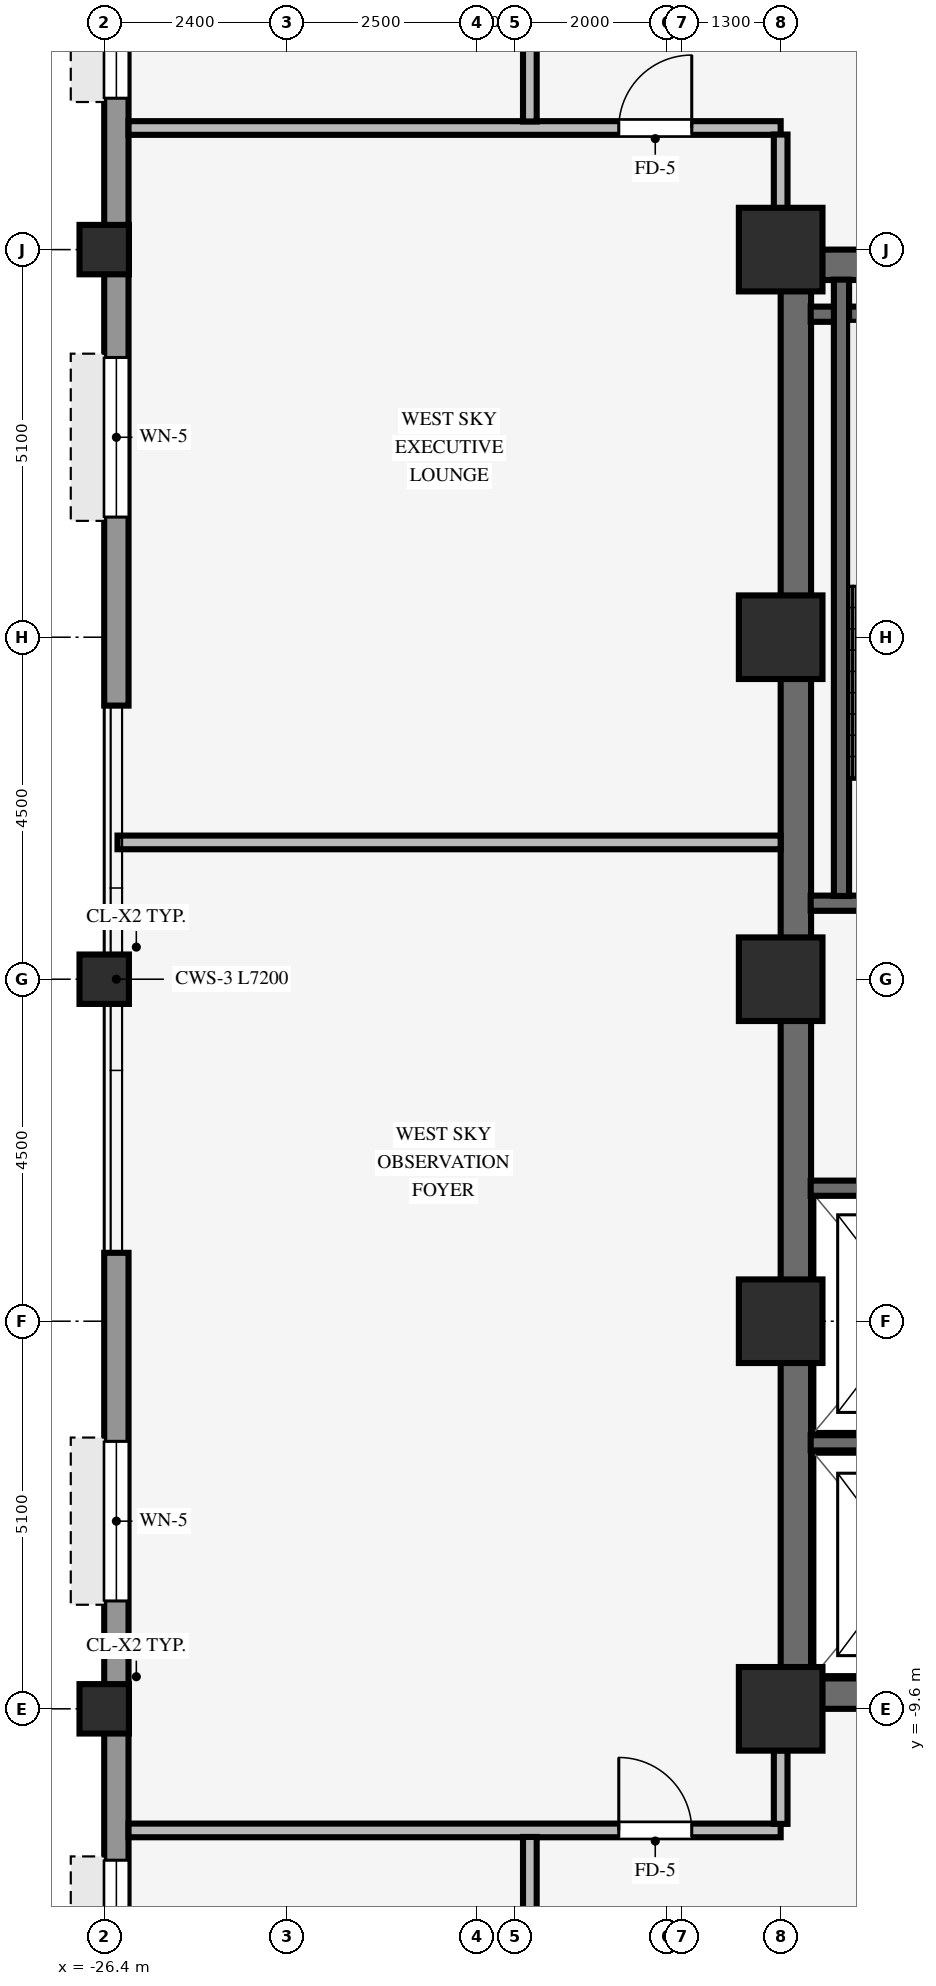
"""IFC4 building model, lengths in metres.
Left out: names, types, materials, properties, quantities, classifications, styles, units other than length and angle.
Written with IfcOpenShell. Run it as: python <this file> out.ifc"""

import sys

from ifc_helpers import new_model, si_unit, direction, frame, frame_2d, origin, origin_2d, place, context, subcontext, project, spatial, rectangle, hollow_rectangle, extrude, source, transform, mapped, element, fill, save


model = new_model("IFC4")
c1 = context("Model", 3, precision=1e-05, world=origin(), true_north=direction((0.0, 1.0)))
c2 = subcontext(c1, "Body", "Model", "MODEL_VIEW")
j1 = project(units=[si_unit("LENGTHUNIT", "METRE"), si_unit("PLANEANGLEUNIT", "RADIAN")], contexts=[c1])
p1 = place(None, origin())
s1 = spatial("IfcSite", under=j1, at=p1, CompositionType="ELEMENT")
p2 = place(p1, origin())
s2 = spatial("IfcBuilding", under=s1, at=p2, CompositionType="ELEMENT")
p3 = place(p2, frame((0.0, 0.0, 120.2)))
s3 = spatial("IfcBuildingStorey", under=s2, at=p3, CompositionType="ELEMENT", Elevation=120.2)
for number, where, z_axis, x_axis in (
    (1, (-17.5, -9.4, 0.0), (0.0, 0.0, 1.0), (1.0, 0.0, 0.0)),
    (2, (-17.5, 9.4, 0.0), (0.0, 0.0, 1.0), (1.0, 0.0, 0.0)),
):
    element("IfcWall", number, at=place(p3, frame(where, z_axis=z_axis, x_axis=x_axis)), inside=s3, PredefinedType="SHEAR", context=c2, shape_type="SweptSolid", body=[
        extrude(rectangle(XDim=8.5, YDim=0.4, at=frame_2d((4.25, 0.0))), origin(), (0.0, 0.0, 1.0), 3.37),
    ])
p4 = place(p3, frame((-17.3, -9.205, 0.0), z_axis=(0.0, 0.0, 1.0), x_axis=(0.0, 1.0, 0.0)))
e3 = element("IfcWall", 3, at=p4, inside=s3, PredefinedType="SHEAR", context=c2, shape_type="SweptSolid", body=[
    extrude(rectangle(XDim=18.41, YDim=0.4, at=frame_2d((9.205, 0.0))), origin(), (0.0, 0.0, 1.0), 3.37),
])
for number, where, z_axis, x_axis in (
    (4, (-17.5, -9.6, 0.0), (0.0, 0.0, 1.0), (1.0, 0.0, 0.0)),
    (5, (-17.5, -4.5, 0.0), (0.0, 0.0, 1.0), (1.0, 0.0, 0.0)),
    (6, (-17.5, 4.5, 0.0), (0.0, 0.0, 1.0), (1.0, 0.0, 0.0)),
    (7, (-17.5, 9.6, 0.0), (0.0, 0.0, 1.0), (1.0, 0.0, 0.0)),
    (8, (-17.5, 0.0, 0.0), (0.0, 0.0, 1.0), (1.0, 0.0, 0.0)),
):
    element("IfcColumn", number, at=place(p3, frame(where, z_axis=z_axis, x_axis=x_axis)), inside=s3, PredefinedType="COLUMN", context=c2, shape_type="SweptSolid", body=[
        extrude(rectangle(XDim=1.1, YDim=1.1, at=origin_2d()), origin(), (0.0, 0.0, 1.0), 3.37),
    ])
for number, where, z_axis, x_axis in (
    (9, (-26.4, -9.6, 0.0), (0.0, 0.0, 1.0), (1.0, 0.0, 0.0)),
    (10, (-26.4, 0.0, 0.0), (0.0, 0.0, 1.0), (1.0, 0.0, 0.0)),
    (11, (-26.4, 9.6, 0.0), (0.0, 0.0, 1.0), (1.0, 0.0, 0.0)),
):
    element("IfcColumn", number, at=place(p3, frame(where, z_axis=z_axis, x_axis=x_axis)), inside=s3, PredefinedType="COLUMN", context=c2, shape_type="SweptSolid", body=[
        extrude(hollow_rectangle(XDim=0.65, YDim=0.65, WallThickness=0.04, InnerFilletRadius=0.04, OuterFilletRadius=0.08, at=origin_2d()), origin(), (0.0, 0.0, 1.0), 3.37),
    ])
p5 = place(p3, frame((-26.24, -20.784, 0.0), z_axis=(0.0, 0.0, 1.0), x_axis=(0.0, 1.0, 0.0)))
e12 = element("IfcWall", 12, at=p5, inside=s3, PredefinedType="STANDARD", context=c2, shape_type="SweptSolid", body=[
    extrude(rectangle(XDim=17.184, YDim=0.32, at=frame_2d((8.592, 0.0))), origin(), (0.0, 0.0, 1.0), 2.705),
])
p6 = place(p5, frame((7.092, 0.0, 0.8)))
e13 = element("IfcOpeningElement", 13, at=p6, cuts=e12, PredefinedType="OPENING", context=c2, shape_type="SweptSolid", body=[
    extrude(rectangle(XDim=2.1, YDim=1.56, at=frame_2d((1.05, 0.78))), frame((0.0, 0.17, 0.0), z_axis=(0.0, -1.0, 0.0), x_axis=(1.0, 0.0, 0.0)), (0.0, 0.0, 1.0), 0.34),
])
p7 = place(p5, frame((12.603, 0.0, 0.8)))
e14 = element("IfcOpeningElement", 14, at=p7, cuts=e12, PredefinedType="OPENING", context=c2, shape_type="SweptSolid", body=[
    extrude(rectangle(XDim=2.1, YDim=1.56, at=frame_2d((1.05, 0.78))), frame((0.0, 0.17, 0.0), z_axis=(0.0, -1.0, 0.0), x_axis=(1.0, 0.0, 0.0)), (0.0, 0.0, 1.0), 0.34),
])
p8 = place(p3, frame((-26.24, 3.6, 0.0), z_axis=(0.0, 0.0, 1.0), x_axis=(0.0, 1.0, 0.0)))
e15 = element("IfcWall", 15, at=p8, inside=s3, PredefinedType="STANDARD", context=c2, shape_type="SweptSolid", body=[
    extrude(rectangle(XDim=17.184, YDim=0.32, at=frame_2d((8.592, 0.0))), origin(), (0.0, 0.0, 1.0), 2.705),
])
p9 = place(p8, frame((2.481, 0.0, 0.8)))
e16 = element("IfcOpeningElement", 16, at=p9, cuts=e15, PredefinedType="OPENING", context=c2, shape_type="SweptSolid", body=[
    extrude(rectangle(XDim=2.1, YDim=1.56, at=frame_2d((1.05, 0.78))), frame((0.0, 0.17, 0.0), z_axis=(0.0, -1.0, 0.0), x_axis=(1.0, 0.0, 0.0)), (0.0, 0.0, 1.0), 0.34),
])
p10 = place(p8, frame((7.992, 0.0, 0.8)))
e17 = element("IfcOpeningElement", 17, at=p10, cuts=e15, PredefinedType="OPENING", context=c2, shape_type="SweptSolid", body=[
    extrude(rectangle(XDim=2.1, YDim=1.56, at=frame_2d((1.05, 0.78))), frame((0.0, 0.17, 0.0), z_axis=(0.0, -1.0, 0.0), x_axis=(1.0, 0.0, 0.0)), (0.0, 0.0, 1.0), 0.34),
])
for number, where, z_axis, x_axis in (
    (18, (-17.105, 1.0, 0.0), (0.0, 0.0, 1.0), (1.0, 0.0, 0.0)),
    (19, (-17.105, 8.75, 0.0), (0.0, 0.0, 1.0), (1.0, 0.0, 0.0)),
):
    element("IfcWall", number, at=place(p3, frame(where, z_axis=z_axis, x_axis=x_axis)), inside=s3, PredefinedType="SHEAR", context=c2, shape_type="SweptSolid", body=[
        extrude(rectangle(XDim=3.57, YDim=0.2, at=frame_2d((1.785, 0.0))), origin(), (0.0, 0.0, 1.0), 3.37),
    ])
p11 = place(p3, frame((-16.7, 1.095, 0.0), z_axis=(0.0, 0.0, 1.0), x_axis=(0.0, 1.0, 0.0)))
e20 = element("IfcWall", 20, at=p11, inside=s3, PredefinedType="SHEAR", context=c2, shape_type="SweptSolid", body=[
    extrude(rectangle(XDim=8.11, YDim=0.2, at=frame_2d((4.055, 0.0))), origin(), (0.0, 0.0, 1.0), 3.37),
])
p12 = place(p3, frame((-17.105, -6.1, 0.0), z_axis=(0.0, 0.0, 1.0), x_axis=(1.0, 0.0, 0.0)))
e21 = element("IfcWall", 21, at=p12, inside=s3, PredefinedType="SHEAR", context=c2, shape_type="SweptSolid", body=[
    extrude(rectangle(XDim=2.855, YDim=0.2, at=frame_2d((1.427, 0.0))), origin(), (0.0, 0.0, 1.0), 3.37),
])
p13 = place(p3, frame((-17.105, -2.75, 0.0), z_axis=(0.0, 0.0, 1.0), x_axis=(1.0, 0.0, 0.0)))
e22 = element("IfcWall", 22, at=p13, inside=s3, PredefinedType="SHEAR", context=c2, shape_type="SweptSolid", body=[
    extrude(rectangle(XDim=2.66, YDim=0.2, at=frame_2d((1.33, 0.0))), origin(), (0.0, 0.0, 1.0), 3.37),
])
p14 = place(p3, frame((-26.08, -11.2, 0.0), z_axis=(0.0, 0.0, 1.0), x_axis=(1.0, 0.0, 0.0)))
e23 = element("IfcWall", 23, at=p14, inside=s3, PredefinedType="PARTITIONING", context=c2, shape_type="SweptSolid", body=[
    extrude(rectangle(XDim=8.58, YDim=0.18, at=frame_2d((4.29, 0.0))), origin(), (0.0, 0.0, 1.0), 3.36),
])
p15 = place(p14, frame((6.45, 0.0, 0.0)))
e24 = element("IfcOpeningElement", 24, at=p15, cuts=e23, PredefinedType="OPENING", context=c2, shape_type="SweptSolid", body=[
    extrude(rectangle(XDim=0.96, YDim=2.1, at=frame_2d((0.48, 1.05))), frame((0.0, 0.1, 0.0), z_axis=(0.0, -1.0, 0.0), x_axis=(1.0, 0.0, 0.0)), (0.0, 0.0, 1.0), 0.2),
])
p16 = place(p3, frame((-26.225, 1.8, 0.0), z_axis=(0.0, 0.0, 1.0), x_axis=(1.0, 0.0, 0.0)))
e25 = element("IfcWall", 25, at=p16, inside=s3, PredefinedType="PARTITIONING", context=c2, shape_type="SweptSolid", body=[
    extrude(rectangle(XDim=8.725, YDim=0.18, at=frame_2d((4.363, 0.0))), origin(), (0.0, 0.0, 1.0), 3.36),
])
p17 = place(p3, frame((-26.08, 11.2, 0.0), z_axis=(0.0, 0.0, 1.0), x_axis=(1.0, 0.0, 0.0)))
e26 = element("IfcWall", 26, at=p17, inside=s3, PredefinedType="PARTITIONING", context=c2, shape_type="SweptSolid", body=[
    extrude(rectangle(XDim=8.58, YDim=0.18, at=frame_2d((4.29, 0.0))), origin(), (0.0, 0.0, 1.0), 3.36),
])
p18 = place(p17, frame((6.45, 0.0, 0.0)))
e27 = element("IfcOpeningElement", 27, at=p18, cuts=e26, PredefinedType="OPENING", context=c2, shape_type="SweptSolid", body=[
    extrude(rectangle(XDim=0.96, YDim=2.1, at=frame_2d((0.48, 1.05))), frame((0.0, 0.1, 0.0), z_axis=(0.0, -1.0, 0.0), x_axis=(1.0, 0.0, 0.0)), (0.0, 0.0, 1.0), 0.2),
])
for number, where, z_axis, x_axis in (
    (28, (-20.8, -13.514, 0.0), (0.0, 0.0, 1.0), (0.0, 1.0, 0.0)),
    (29, (-20.8, 11.286, 0.0), (0.0, 0.0, 1.0), (0.0, 1.0, 0.0)),
):
    element("IfcWall", number, at=place(p3, frame(where, z_axis=z_axis, x_axis=x_axis)), inside=s3, PredefinedType="PARTITIONING", context=c2, shape_type="SweptSolid", body=[
        extrude(rectangle(XDim=2.228, YDim=0.18, at=frame_2d((1.114, 0.0))), origin(), (0.0, 0.0, 1.0), 3.36),
    ])
for number, where, z_axis, x_axis in (
    (30, (-17.5, -11.114, 0.0), (0.0, 0.0, 1.0), (0.0, 1.0, 0.0)),
    (31, (-17.5, 10.146, 0.0), (0.0, 0.0, 1.0), (0.0, 1.0, 0.0)),
):
    element("IfcWall", number, at=place(p3, frame(where, z_axis=z_axis, x_axis=x_axis)), inside=s3, PredefinedType="PARTITIONING", context=c2, shape_type="SweptSolid", body=[
        extrude(rectangle(XDim=0.968, YDim=0.18, at=frame_2d((0.484, 0.0))), origin(), (0.0, 0.0, 1.0), 2.816),
    ])
m1 = source(origin(), c2, "Body", "SweptSolid", [
    extrude(rectangle(XDim=2.1, YDim=1.56, at=frame_2d((1.05, 0.78))), frame((0.0, 0.03, 0.0), z_axis=(0.0, -1.0, 0.0), x_axis=(1.0, 0.0, 0.0)), (0.0, 0.0, 1.0), 0.06),
])
p19 = place(p6, origin())
e32 = element("IfcWindow", 32, at=p19, inside=s3, PartitioningType="SINGLE_PANEL", PredefinedType="WINDOW", context=c2, shape_type="MappedRepresentation", body=[
    mapped(m1, transform((0.0, 0.0, 0.0), scale=1.0)),
])
fill(e13, e32)
p20 = place(p7, origin())
e33 = element("IfcWindow", 33, at=p20, inside=s3, PartitioningType="SINGLE_PANEL", PredefinedType="WINDOW", context=c2, shape_type="MappedRepresentation", body=[
    mapped(m1, transform((0.0, 0.0, 0.0), scale=1.0)),
])
fill(e14, e33)
p21 = place(p9, origin())
e34 = element("IfcWindow", 34, at=p21, inside=s3, PartitioningType="SINGLE_PANEL", PredefinedType="WINDOW", context=c2, shape_type="MappedRepresentation", body=[
    mapped(m1, transform((0.0, 0.0, 0.0), scale=1.0)),
])
fill(e16, e34)
p22 = place(p10, origin())
e35 = element("IfcWindow", 35, at=p22, inside=s3, PartitioningType="SINGLE_PANEL", PredefinedType="WINDOW", context=c2, shape_type="MappedRepresentation", body=[
    mapped(m1, transform((0.0, 0.0, 0.0), scale=1.0)),
])
fill(e17, e35)
m2 = source(origin(), c2, "Body", "SweptSolid", [
    extrude(rectangle(XDim=0.96, YDim=2.1, at=frame_2d((0.48, 1.05))), frame((0.0, 0.025, 0.0), z_axis=(0.0, -1.0, 0.0), x_axis=(1.0, 0.0, 0.0)), (0.0, 0.0, 1.0), 0.05),
])
p23 = place(p15, origin())
e36 = element("IfcDoor", 36, at=p23, inside=s3, OperationType="SINGLE_SWING_LEFT", PredefinedType="DOOR", context=c2, shape_type="MappedRepresentation", body=[
    mapped(m2, transform((0.0, 0.0, 0.0), scale=1.0)),
])
fill(e24, e36)
p24 = place(p18, origin())
e37 = element("IfcDoor", 37, at=p24, inside=s3, OperationType="SINGLE_SWING_RIGHT", PredefinedType="DOOR", context=c2, shape_type="MappedRepresentation", body=[
    mapped(m2, transform((0.0, 0.0, 0.0), scale=1.0)),
])
fill(e27, e37)
save(model, sys.argv[1])
